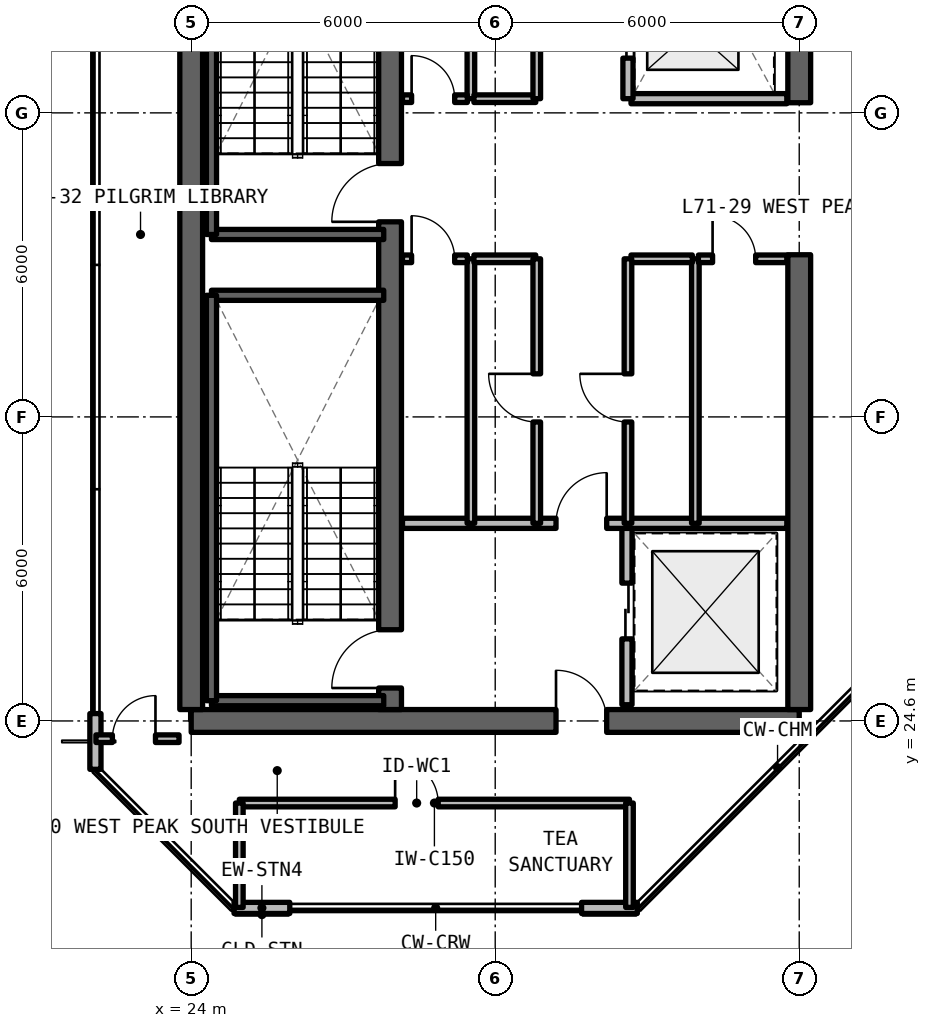
"""IFC4 building model, lengths in metres.
Left out: names, types, materials, properties, quantities, classifications, styles, units other than length and angle.
Written with IfcOpenShell. Run it as: python <this file> out.ifc"""

import sys

from ifc_helpers import new_model, si_unit, direction, frame, frame_2d, origin, place, context, subcontext, project, spatial, rectangle, extrude, element, fill, save


model = new_model("IFC4")
c1 = context("Model", 3, precision=1e-05, world=origin(), true_north=direction((0.0, 1.0)))
c2 = subcontext(c1, "Body", "Model", "MODEL_VIEW")
j1 = project(units=[si_unit("LENGTHUNIT", "METRE"), si_unit("PLANEANGLEUNIT", "RADIAN")], contexts=[c1])
p1 = place(None, origin())
s1 = spatial("IfcSite", under=j1, at=p1, CompositionType="ELEMENT")
p2 = place(p1, origin())
s2 = spatial("IfcBuilding", under=s1, at=p2, CompositionType="ELEMENT")
p3 = place(p2, frame((0.0, 0.0, 253.44)))
s3 = spatial("IfcBuildingStorey", under=s2, at=p3, CompositionType="ELEMENT", Elevation=253.44)
p4 = place(p3, frame((24.0, 24.6, 0.0), z_axis=(0.0, 0.0, 1.0), x_axis=(1.0, 0.0, 0.0)))
e1 = element("IfcWall", 1, at=p4, inside=s3, PredefinedType="SHEAR", context=c2, shape_type="SweptSolid", body=[
    extrude(rectangle(XDim=12.0, YDim=0.45, at=frame_2d((6.0, 0.0))), origin(), (0.0, 0.0, 1.0), 3.63),
])
p5 = place(p4, frame((7.2, 0.0, 0.0)))
e2 = element("IfcOpeningElement", 2, at=p5, cuts=e1, PredefinedType="OPENING", context=c2, shape_type="SweptSolid", body=[
    extrude(rectangle(XDim=1.0, YDim=2.15, at=frame_2d((0.5, 1.075))), frame((0.0, 0.235, 0.0), z_axis=(0.0, -1.0, 0.0), x_axis=(1.0, 0.0, 0.0)), (0.0, 0.0, 1.0), 0.47),
])
p6 = place(p3, frame((24.0, 24.825, 0.0), z_axis=(0.0, 0.0, 1.0), x_axis=(0.0, 1.0, 0.0)))
e3 = element("IfcWall", 3, at=p6, inside=s3, PredefinedType="SHEAR", context=c2, shape_type="SweptSolid", body=[
    extrude(rectangle(XDim=17.55, YDim=0.45, at=frame_2d((8.775, 0.0))), origin(), (0.0, 0.0, 1.0), 3.63),
])
p7 = place(p3, frame((36.0, 24.825, 0.0), z_axis=(0.0, 0.0, 1.0), x_axis=(0.0, 1.0, 0.0)))
e4 = element("IfcWall", 4, at=p7, inside=s3, PredefinedType="SHEAR", context=c2, shape_type="SweptSolid", body=[
    extrude(rectangle(XDim=8.975, YDim=0.45, at=frame_2d((4.488, 0.0))), origin(), (0.0, 0.0, 1.0), 3.63),
])
p8 = place(p3, frame((36.0, 36.8, 0.0), z_axis=(0.0, 0.0, 1.0), x_axis=(0.0, 1.0, 0.0)))
e5 = element("IfcWall", 5, at=p8, inside=s3, PredefinedType="SHEAR", context=c2, shape_type="SweptSolid", body=[
    extrude(rectangle(XDim=5.575, YDim=0.45, at=frame_2d((2.788, 0.0))), origin(), (0.0, 0.0, 1.0), 3.63),
])
p9 = place(p3, frame((27.925, 24.825, 0.0), z_axis=(0.0, 0.0, 1.0), x_axis=(0.0, 1.0, 0.0)))
e6 = element("IfcWall", 6, at=p9, inside=s3, PredefinedType="SHEAR", context=c2, shape_type="SweptSolid", body=[
    extrude(rectangle(XDim=17.55, YDim=0.45, at=frame_2d((8.775, 0.0))), origin(), (0.0, 0.0, 1.0), 3.63),
])
p10 = place(p9, frame((0.425, 0.0, 0.0)))
e7 = element("IfcOpeningElement", 7, at=p10, cuts=e6, PredefinedType="OPENING", context=c2, shape_type="SweptSolid", body=[
    extrude(rectangle(XDim=1.15, YDim=2.15, at=frame_2d((0.575, 1.075))), frame((0.0, 0.235, 0.0), z_axis=(0.0, -1.0, 0.0), x_axis=(1.0, 0.0, 0.0)), (0.0, 0.0, 1.0), 0.47),
])
p11 = place(p9, frame((9.625, 0.0, 0.0)))
e8 = element("IfcOpeningElement", 8, at=p11, cuts=e6, PredefinedType="OPENING", context=c2, shape_type="SweptSolid", body=[
    extrude(rectangle(XDim=1.15, YDim=2.15, at=frame_2d((0.575, 1.075))), frame((0.0, 0.235, 0.0), z_axis=(0.0, -1.0, 0.0), x_axis=(1.0, 0.0, 0.0)), (0.0, 0.0, 1.0), 0.47),
])
p12 = place(p3, frame((24.846, 20.91, 0.0), z_axis=(0.0, 0.0, 1.0), x_axis=(1.0, 0.0, 0.0)))
e9 = element("IfcWall", 9, at=p12, inside=s3, PredefinedType="SOLIDWALL", context=c2, shape_type="SweptSolid", body=[
    extrude(rectangle(XDim=1.1, YDim=0.22, at=frame_2d((0.55, 0.0))), origin(), (0.0, 0.0, 1.0), 3.41),
])
for number, where, z_axis, x_axis in (
    (10, (31.704, 20.91, 0.0), (0.0, 0.0, 1.0), (1.0, 0.0, 0.0)),
    (11, (22.11, 24.746, 0.0), (0.0, 0.0, 1.0), (0.0, -1.0, 0.0)),
):
    element("IfcWall", number, at=place(p3, frame(where, z_axis=z_axis, x_axis=x_axis)), inside=s3, PredefinedType="SOLIDWALL", context=c2, shape_type="SweptSolid", body=[
        extrude(rectangle(XDim=1.1, YDim=0.22, at=frame_2d((0.55, 0.0))), origin(), (0.0, 0.0, 1.0), 3.41),
    ])
p13 = place(p3, frame((32.6, 24.92, 0.0), z_axis=(0.0, 0.0, 1.0), x_axis=(0.0, 1.0, 0.0)))
e12 = element("IfcWall", 12, at=p13, inside=s3, PredefinedType="SOLIDWALL", context=c2, shape_type="SweptSolid", body=[
    extrude(rectangle(XDim=3.58, YDim=0.2, at=frame_2d((1.79, 0.0))), origin(), (0.0, 0.0, 1.0), 2.63),
])
p14 = place(p13, frame((1.3, 0.0, 0.0)))
e13 = element("IfcOpeningElement", 13, at=p14, cuts=e12, PredefinedType="OPENING", context=c2, shape_type="SweptSolid", body=[
    extrude(rectangle(XDim=1.1, YDim=2.2, at=frame_2d((0.55, 1.1))), frame((0.0, 0.11, 0.0), z_axis=(0.0, -1.0, 0.0), x_axis=(1.0, 0.0, 0.0)), (0.0, 0.0, 1.0), 0.22),
])
p15 = place(p3, frame((28.17, 28.5, 0.0), z_axis=(0.0, 0.0, 1.0), x_axis=(1.0, 0.0, 0.0)))
e14 = element("IfcWall", 14, at=p15, inside=s3, PredefinedType="SOLIDWALL", context=c2, shape_type="SweptSolid", body=[
    extrude(rectangle(XDim=7.585, YDim=0.2, at=frame_2d((3.792, 0.0))), origin(), (0.0, 0.0, 1.0), 2.63),
])
p16 = place(p15, frame((3.03, 0.0, 0.0)))
e15 = element("IfcOpeningElement", 15, at=p16, cuts=e14, PredefinedType="OPENING", context=c2, shape_type="SweptSolid", body=[
    extrude(rectangle(XDim=1.0, YDim=2.15, at=frame_2d((0.5, 1.075))), frame((0.0, 0.11, 0.0), z_axis=(0.0, -1.0, 0.0), x_axis=(1.0, 0.0, 0.0)), (0.0, 0.0, 1.0), 0.22),
])
p17 = place(p3, frame((29.52, 28.5, 0.0), z_axis=(0.0, 0.0, 1.0), x_axis=(0.0, 1.0, 0.0)))
e16 = element("IfcWall", 16, at=p17, inside=s3, PredefinedType="SOLIDWALL", context=c2, shape_type="SweptSolid", body=[
    extrude(rectangle(XDim=5.22, YDim=0.15, at=frame_2d((2.61, 0.0))), origin(), (0.0, 0.0, 1.0), 2.63),
])
p18 = place(p3, frame((28.17, 33.72, 0.0), z_axis=(0.0, 0.0, 1.0), x_axis=(1.0, 0.0, 0.0)))
e17 = element("IfcWall", 17, at=p18, inside=s3, PredefinedType="SOLIDWALL", context=c2, shape_type="SweptSolid", body=[
    extrude(rectangle(XDim=1.28, YDim=0.15, at=frame_2d((0.64, 0.0))), origin(), (0.0, 0.0, 1.0), 2.63),
])
p19 = place(p18, frame((0.18, 0.0, 0.0)))
e18 = element("IfcOpeningElement", 18, at=p19, cuts=e17, PredefinedType="OPENING", context=c2, shape_type="SweptSolid", body=[
    extrude(rectangle(XDim=0.85, YDim=2.1, at=frame_2d((0.425, 1.05))), frame((0.0, 0.085, 0.0), z_axis=(0.0, -1.0, 0.0), x_axis=(1.0, 0.0, 0.0)), (0.0, 0.0, 1.0), 0.17),
])
p20 = place(p3, frame((29.58, 33.72, 0.0), z_axis=(0.0, 0.0, 1.0), x_axis=(1.0, 0.0, 0.0)))
e19 = element("IfcWall", 19, at=p20, inside=s3, PredefinedType="SOLIDWALL", context=c2, shape_type="SweptSolid", body=[
    extrude(rectangle(XDim=1.22, YDim=0.15, at=frame_2d((0.61, 0.0))), origin(), (0.0, 0.0, 1.0), 2.63),
])
p21 = place(p3, frame((30.82, 28.5, 0.0), z_axis=(0.0, 0.0, 1.0), x_axis=(0.0, 1.0, 0.0)))
e20 = element("IfcWall", 20, at=p21, inside=s3, PredefinedType="SOLIDWALL", context=c2, shape_type="SweptSolid", body=[
    extrude(rectangle(XDim=5.22, YDim=0.15, at=frame_2d((2.61, 0.0))), origin(), (0.0, 0.0, 1.0), 2.63),
])
p22 = place(p21, frame((2.0, 0.0, 0.0)))
e21 = element("IfcOpeningElement", 21, at=p22, cuts=e20, PredefinedType="OPENING", context=c2, shape_type="SweptSolid", body=[
    extrude(rectangle(XDim=0.95, YDim=2.15, at=frame_2d((0.475, 1.075))), frame((0.0, 0.085, 0.0), z_axis=(0.0, -1.0, 0.0), x_axis=(1.0, 0.0, 0.0)), (0.0, 0.0, 1.0), 0.17),
])
p23 = place(p3, frame((33.95, 28.5, 0.0), z_axis=(0.0, 0.0, 1.0), x_axis=(0.0, 1.0, 0.0)))
e22 = element("IfcWall", 22, at=p23, inside=s3, PredefinedType="SOLIDWALL", context=c2, shape_type="SweptSolid", body=[
    extrude(rectangle(XDim=5.22, YDim=0.15, at=frame_2d((2.61, 0.0))), origin(), (0.0, 0.0, 1.0), 2.63),
])
p24 = place(p3, frame((32.68, 33.72, 0.0), z_axis=(0.0, 0.0, 1.0), x_axis=(1.0, 0.0, 0.0)))
e23 = element("IfcWall", 23, at=p24, inside=s3, PredefinedType="SOLIDWALL", context=c2, shape_type="SweptSolid", body=[
    extrude(rectangle(XDim=1.21, YDim=0.15, at=frame_2d((0.605, 0.0))), origin(), (0.0, 0.0, 1.0), 2.63),
])
p25 = place(p3, frame((34.01, 33.72, 0.0), z_axis=(0.0, 0.0, 1.0), x_axis=(1.0, 0.0, 0.0)))
e24 = element("IfcWall", 24, at=p25, inside=s3, PredefinedType="SOLIDWALL", context=c2, shape_type="SweptSolid", body=[
    extrude(rectangle(XDim=1.745, YDim=0.15, at=frame_2d((0.873, 0.0))), origin(), (0.0, 0.0, 1.0), 2.63),
])
p26 = place(p25, frame((0.28, 0.0, 0.0)))
e25 = element("IfcOpeningElement", 25, at=p26, cuts=e24, PredefinedType="OPENING", context=c2, shape_type="SweptSolid", body=[
    extrude(rectangle(XDim=0.85, YDim=2.1, at=frame_2d((0.425, 1.05))), frame((0.0, 0.085, 0.0), z_axis=(0.0, -1.0, 0.0), x_axis=(1.0, 0.0, 0.0)), (0.0, 0.0, 1.0), 0.17),
])
p27 = place(p3, frame((32.62, 28.5, 0.0), z_axis=(0.0, 0.0, 1.0), x_axis=(0.0, 1.0, 0.0)))
e26 = element("IfcWall", 26, at=p27, inside=s3, PredefinedType="SOLIDWALL", context=c2, shape_type="SweptSolid", body=[
    extrude(rectangle(XDim=5.22, YDim=0.15, at=frame_2d((2.61, 0.0))), origin(), (0.0, 0.0, 1.0), 2.63),
])
p28 = place(p27, frame((2.0, 0.0, 0.0)))
e27 = element("IfcOpeningElement", 27, at=p28, cuts=e26, PredefinedType="OPENING", context=c2, shape_type="SweptSolid", body=[
    extrude(rectangle(XDim=0.95, YDim=2.15, at=frame_2d((0.475, 1.075))), frame((0.0, 0.085, 0.0), z_axis=(0.0, -1.0, 0.0), x_axis=(1.0, 0.0, 0.0)), (0.0, 0.0, 1.0), 0.17),
])
p29 = place(p3, frame((29.52, 36.88, 0.0), z_axis=(0.0, 0.0, 1.0), x_axis=(0.0, 1.0, 0.0)))
e28 = element("IfcWall", 28, at=p29, inside=s3, PredefinedType="SOLIDWALL", context=c2, shape_type="SweptSolid", body=[
    extrude(rectangle(XDim=5.42, YDim=0.15, at=frame_2d((2.71, 0.0))), origin(), (0.0, 0.0, 1.0), 2.63),
])
p30 = place(p3, frame((28.17, 36.88, 0.0), z_axis=(0.0, 0.0, 1.0), x_axis=(1.0, 0.0, 0.0)))
e29 = element("IfcWall", 29, at=p30, inside=s3, PredefinedType="SOLIDWALL", context=c2, shape_type="SweptSolid", body=[
    extrude(rectangle(XDim=1.28, YDim=0.15, at=frame_2d((0.64, 0.0))), origin(), (0.0, 0.0, 1.0), 2.63),
])
p31 = place(p30, frame((0.18, 0.0, 0.0)))
e30 = element("IfcOpeningElement", 30, at=p31, cuts=e29, PredefinedType="OPENING", context=c2, shape_type="SweptSolid", body=[
    extrude(rectangle(XDim=0.85, YDim=2.1, at=frame_2d((0.425, 1.05))), frame((0.0, 0.085, 0.0), z_axis=(0.0, -1.0, 0.0), x_axis=(1.0, 0.0, 0.0)), (0.0, 0.0, 1.0), 0.17),
])
p32 = place(p3, frame((29.58, 36.88, 0.0), z_axis=(0.0, 0.0, 1.0), x_axis=(1.0, 0.0, 0.0)))
e31 = element("IfcWall", 31, at=p32, inside=s3, PredefinedType="SOLIDWALL", context=c2, shape_type="SweptSolid", body=[
    extrude(rectangle(XDim=1.22, YDim=0.15, at=frame_2d((0.61, 0.0))), origin(), (0.0, 0.0, 1.0), 2.63),
])
p33 = place(p3, frame((30.82, 36.88, 0.0), z_axis=(0.0, 0.0, 1.0), x_axis=(0.0, 1.0, 0.0)))
e32 = element("IfcWall", 32, at=p33, inside=s3, PredefinedType="SOLIDWALL", context=c2, shape_type="SweptSolid", body=[
    extrude(rectangle(XDim=5.42, YDim=0.15, at=frame_2d((2.71, 0.0))), origin(), (0.0, 0.0, 1.0), 2.63),
])
p34 = place(p33, frame((2.1, 0.0, 0.0)))
e33 = element("IfcOpeningElement", 33, at=p34, cuts=e32, PredefinedType="OPENING", context=c2, shape_type="SweptSolid", body=[
    extrude(rectangle(XDim=0.95, YDim=2.15, at=frame_2d((0.475, 1.075))), frame((0.0, 0.085, 0.0), z_axis=(0.0, -1.0, 0.0), x_axis=(1.0, 0.0, 0.0)), (0.0, 0.0, 1.0), 0.17),
])
p35 = place(p3, frame((32.68, 36.88, 0.0), z_axis=(0.0, 0.0, 1.0), x_axis=(1.0, 0.0, 0.0)))
e34 = element("IfcWall", 34, at=p35, inside=s3, PredefinedType="SOLIDWALL", context=c2, shape_type="SweptSolid", body=[
    extrude(rectangle(XDim=3.075, YDim=0.2, at=frame_2d((1.538, 0.0))), origin(), (0.0, 0.0, 1.0), 2.63),
])
p36 = place(p3, frame((32.62, 36.88, 0.0), z_axis=(0.0, 0.0, 1.0), x_axis=(0.0, 1.0, 0.0)))
e35 = element("IfcWall", 35, at=p36, inside=s3, PredefinedType="SOLIDWALL", context=c2, shape_type="SweptSolid", body=[
    extrude(rectangle(XDim=5.42, YDim=0.2, at=frame_2d((2.71, 0.0))), origin(), (0.0, 0.0, 1.0), 2.63),
])
p37 = place(p36, frame((0.8, 0.0, 0.0)))
e36 = element("IfcOpeningElement", 36, at=p37, cuts=e35, PredefinedType="OPENING", context=c2, shape_type="SweptSolid", body=[
    extrude(rectangle(XDim=1.1, YDim=2.2, at=frame_2d((0.55, 1.1))), frame((0.0, 0.11, 0.0), z_axis=(0.0, -1.0, 0.0), x_axis=(1.0, 0.0, 0.0)), (0.0, 0.0, 1.0), 0.22),
])
p38 = place(p36, frame((3.3, 0.0, 0.0)))
e37 = element("IfcOpeningElement", 37, at=p38, cuts=e35, PredefinedType="OPENING", context=c2, shape_type="SweptSolid", body=[
    extrude(rectangle(XDim=1.1, YDim=2.2, at=frame_2d((0.55, 1.1))), frame((0.0, 0.11, 0.0), z_axis=(0.0, -1.0, 0.0), x_axis=(1.0, 0.0, 0.0)), (0.0, 0.0, 1.0), 0.22),
])
p39 = place(p3, frame((24.95, 22.98, 0.0), z_axis=(0.0, 0.0, 1.0), x_axis=(1.0, 0.0, 0.0)))
e38 = element("IfcWall", 38, at=p39, inside=s3, PredefinedType="SOLIDWALL", context=c2, shape_type="SweptSolid", body=[
    extrude(rectangle(XDim=7.7, YDim=0.15, at=frame_2d((3.85, 0.0))), origin(), (0.0, 0.0, 1.0), 2.63),
])
p40 = place(p39, frame((3.075, 0.0, 0.0)))
e39 = element("IfcOpeningElement", 39, at=p40, cuts=e38, PredefinedType="OPENING", context=c2, shape_type="SweptSolid", body=[
    extrude(rectangle(XDim=0.85, YDim=2.1, at=frame_2d((0.425, 1.05))), frame((0.0, 0.085, 0.0), z_axis=(0.0, -1.0, 0.0), x_axis=(1.0, 0.0, 0.0)), (0.0, 0.0, 1.0), 0.17),
])
for number, where, z_axis, x_axis in (
    (40, (24.95, 20.92, 0.0), (0.0, 0.0, 1.0), (0.0, 1.0, 0.0)),
    (41, (32.65, 20.92, 0.0), (0.0, 0.0, 1.0), (0.0, 1.0, 0.0)),
):
    element("IfcWall", number, at=place(p3, frame(where, z_axis=z_axis, x_axis=x_axis)), inside=s3, PredefinedType="SOLIDWALL", context=c2, shape_type="SweptSolid", body=[
        extrude(rectangle(XDim=2.06, YDim=0.15, at=frame_2d((1.03, 0.0))), origin(), (0.0, 0.0, 1.0), 2.63),
    ])
p41 = place(p3, frame((22.12, 24.25, 0.0), z_axis=(0.0, 0.0, 1.0), x_axis=(1.0, 0.0, 0.0)))
e42 = element("IfcWall", 42, at=p41, inside=s3, PredefinedType="SOLIDWALL", context=c2, shape_type="SweptSolid", body=[
    extrude(rectangle(XDim=1.64, YDim=0.15, at=frame_2d((0.82, 0.0))), origin(), (0.0, 0.0, 1.0), 2.63),
])
p42 = place(p41, frame((0.325, 0.0, 0.0)))
e43 = element("IfcOpeningElement", 43, at=p42, cuts=e42, PredefinedType="OPENING", context=c2, shape_type="SweptSolid", body=[
    extrude(rectangle(XDim=0.85, YDim=2.1, at=frame_2d((0.425, 1.05))), frame((0.0, 0.085, 0.0), z_axis=(0.0, -1.0, 0.0), x_axis=(1.0, 0.0, 0.0)), (0.0, 0.0, 1.0), 0.17),
])
for number, where, z_axis, x_axis in (
    (44, (24.4, 25.0, 0.0), (0.0, 0.0, 1.0), (1.0, 0.0, 0.0)),
    (45, (27.8, 33.0, 0.0), (0.0, 0.0, 1.0), (-1.0, 0.0, 0.0)),
):
    element("IfcWall", number, at=place(p3, frame(where, z_axis=z_axis, x_axis=x_axis)), inside=s3, PredefinedType="SOLIDWALL", context=c2, shape_type="SweptSolid", body=[
        extrude(rectangle(XDim=3.4, YDim=0.2, at=frame_2d((1.7, 0.0))), origin(), (0.0, 0.0, 1.0), 3.63),
    ])
p43 = place(p3, frame((24.4, 33.0, 0.0), z_axis=(0.0, 0.0, 1.0), x_axis=(0.0, -1.0, 0.0)))
e46 = element("IfcWall", 46, at=p43, inside=s3, PredefinedType="SOLIDWALL", context=c2, shape_type="SweptSolid", body=[
    extrude(rectangle(XDim=8.0, YDim=0.2, at=frame_2d((4.0, 0.0))), origin(), (0.0, 0.0, 1.0), 3.63),
])
p44 = place(p3, frame((24.4, 34.2, 0.0), z_axis=(0.0, 0.0, 1.0), x_axis=(1.0, 0.0, 0.0)))
e47 = element("IfcWall", 47, at=p44, inside=s3, PredefinedType="SOLIDWALL", context=c2, shape_type="SweptSolid", body=[
    extrude(rectangle(XDim=3.4, YDim=0.2, at=frame_2d((1.7, 0.0))), origin(), (0.0, 0.0, 1.0), 3.63),
])
p45 = place(p3, frame((24.4, 42.2, 0.0), z_axis=(0.0, 0.0, 1.0), x_axis=(0.0, -1.0, 0.0)))
e48 = element("IfcWall", 48, at=p45, inside=s3, PredefinedType="SOLIDWALL", context=c2, shape_type="SweptSolid", body=[
    extrude(rectangle(XDim=8.0, YDim=0.2, at=frame_2d((4.0, 0.0))), origin(), (0.0, 0.0, 1.0), 3.63),
])
p46 = place(p14, origin())
e49 = element("IfcDoor", 49, at=p46, inside=s3, OperationType="SLIDING_TO_LEFT", PredefinedType="DOOR", context=c2, shape_type="SweptSolid", body=[
    extrude(rectangle(XDim=1.1, YDim=2.2, at=frame_2d((0.55, 1.1))), frame((0.0, 0.025, 0.0), z_axis=(0.0, -1.0, 0.0), x_axis=(1.0, 0.0, 0.0)), (0.0, 0.0, 1.0), 0.05),
])
fill(e13, e49)
p47 = place(p16, origin())
e50 = element("IfcDoor", 50, at=p47, inside=s3, OperationType="SINGLE_SWING_RIGHT", PredefinedType="DOOR", context=c2, shape_type="SweptSolid", body=[
    extrude(rectangle(XDim=1.0, YDim=2.15, at=frame_2d((0.5, 1.075))), frame((0.0, 0.025, 0.0), z_axis=(0.0, -1.0, 0.0), x_axis=(1.0, 0.0, 0.0)), (0.0, 0.0, 1.0), 0.05),
])
fill(e15, e50)
p48 = place(p19, origin())
e51 = element("IfcDoor", 51, at=p48, inside=s3, OperationType="SINGLE_SWING_LEFT", PredefinedType="DOOR", context=c2, shape_type="SweptSolid", body=[
    extrude(rectangle(XDim=0.85, YDim=2.1, at=frame_2d((0.425, 1.05))), frame((0.0, 0.025, 0.0), z_axis=(0.0, -1.0, 0.0), x_axis=(1.0, 0.0, 0.0)), (0.0, 0.0, 1.0), 0.05),
])
fill(e18, e51)
p49 = place(p22, origin())
e52 = element("IfcDoor", 52, at=p49, inside=s3, OperationType="SINGLE_SWING_RIGHT", PredefinedType="DOOR", context=c2, shape_type="SweptSolid", body=[
    extrude(rectangle(XDim=0.95, YDim=2.15, at=frame_2d((0.475, 1.075))), frame((0.0, 0.025, 0.0), z_axis=(0.0, -1.0, 0.0), x_axis=(1.0, 0.0, 0.0)), (0.0, 0.0, 1.0), 0.05),
])
fill(e21, e52)
p50 = place(p26, origin())
e53 = element("IfcDoor", 53, at=p50, inside=s3, OperationType="SINGLE_SWING_LEFT", PredefinedType="DOOR", context=c2, shape_type="SweptSolid", body=[
    extrude(rectangle(XDim=0.85, YDim=2.1, at=frame_2d((0.425, 1.05))), frame((0.0, 0.025, 0.0), z_axis=(0.0, -1.0, 0.0), x_axis=(1.0, 0.0, 0.0)), (0.0, 0.0, 1.0), 0.05),
])
fill(e25, e53)
p51 = place(p28, origin())
e54 = element("IfcDoor", 54, at=p51, inside=s3, OperationType="SINGLE_SWING_RIGHT", PredefinedType="DOOR", context=c2, shape_type="SweptSolid", body=[
    extrude(rectangle(XDim=0.95, YDim=2.15, at=frame_2d((0.475, 1.075))), frame((0.0, 0.025, 0.0), z_axis=(0.0, -1.0, 0.0), x_axis=(1.0, 0.0, 0.0)), (0.0, 0.0, 1.0), 0.05),
])
fill(e27, e54)
p52 = place(p31, origin())
e55 = element("IfcDoor", 55, at=p52, inside=s3, OperationType="SINGLE_SWING_LEFT", PredefinedType="DOOR", context=c2, shape_type="SweptSolid", body=[
    extrude(rectangle(XDim=0.85, YDim=2.1, at=frame_2d((0.425, 1.05))), frame((0.0, 0.025, 0.0), z_axis=(0.0, -1.0, 0.0), x_axis=(1.0, 0.0, 0.0)), (0.0, 0.0, 1.0), 0.05),
])
fill(e30, e55)
p53 = place(p37, origin())
e56 = element("IfcDoor", 56, at=p53, inside=s3, OperationType="SLIDING_TO_LEFT", PredefinedType="DOOR", context=c2, shape_type="SweptSolid", body=[
    extrude(rectangle(XDim=1.1, YDim=2.2, at=frame_2d((0.55, 1.1))), frame((0.0, 0.025, 0.0), z_axis=(0.0, -1.0, 0.0), x_axis=(1.0, 0.0, 0.0)), (0.0, 0.0, 1.0), 0.05),
])
fill(e36, e56)
p54 = place(p40, origin())
e57 = element("IfcDoor", 57, at=p54, inside=s3, OperationType="SINGLE_SWING_LEFT", PredefinedType="DOOR", context=c2, shape_type="SweptSolid", body=[
    extrude(rectangle(XDim=0.85, YDim=2.1, at=frame_2d((0.425, 1.05))), frame((0.0, 0.025, 0.0), z_axis=(0.0, -1.0, 0.0), x_axis=(1.0, 0.0, 0.0)), (0.0, 0.0, 1.0), 0.05),
])
fill(e39, e57)
p55 = place(p42, origin())
e58 = element("IfcDoor", 58, at=p55, inside=s3, OperationType="SINGLE_SWING_RIGHT", PredefinedType="DOOR", context=c2, shape_type="SweptSolid", body=[
    extrude(rectangle(XDim=0.85, YDim=2.1, at=frame_2d((0.425, 1.05))), frame((0.0, 0.025, 0.0), z_axis=(0.0, -1.0, 0.0), x_axis=(1.0, 0.0, 0.0)), (0.0, 0.0, 1.0), 0.05),
])
fill(e43, e58)
p56 = place(p10, origin())
e59 = element("IfcDoor", 59, at=p56, inside=s3, OperationType="SINGLE_SWING_RIGHT", PredefinedType="DOOR", context=c2, shape_type="SweptSolid", body=[
    extrude(rectangle(XDim=1.15, YDim=2.15, at=frame_2d((0.575, 1.075))), frame((0.0, 0.025, 0.0), z_axis=(0.0, -1.0, 0.0), x_axis=(1.0, 0.0, 0.0)), (0.0, 0.0, 1.0), 0.05),
])
fill(e7, e59)
p57 = place(p11, origin())
e60 = element("IfcDoor", 60, at=p57, inside=s3, OperationType="SINGLE_SWING_LEFT", PredefinedType="DOOR", context=c2, shape_type="SweptSolid", body=[
    extrude(rectangle(XDim=1.15, YDim=2.15, at=frame_2d((0.575, 1.075))), frame((0.0, 0.025, 0.0), z_axis=(0.0, -1.0, 0.0), x_axis=(1.0, 0.0, 0.0)), (0.0, 0.0, 1.0), 0.05),
])
fill(e8, e60)
p58 = place(p5, origin())
e61 = element("IfcDoor", 61, at=p58, inside=s3, OperationType="SINGLE_SWING_LEFT", PredefinedType="DOOR", context=c2, shape_type="SweptSolid", body=[
    extrude(rectangle(XDim=1.0, YDim=2.15, at=frame_2d((0.5, 1.075))), frame((0.0, 0.025, 0.0), z_axis=(0.0, -1.0, 0.0), x_axis=(1.0, 0.0, 0.0)), (0.0, 0.0, 1.0), 0.05),
])
fill(e2, e61)
save(model, sys.argv[1])
